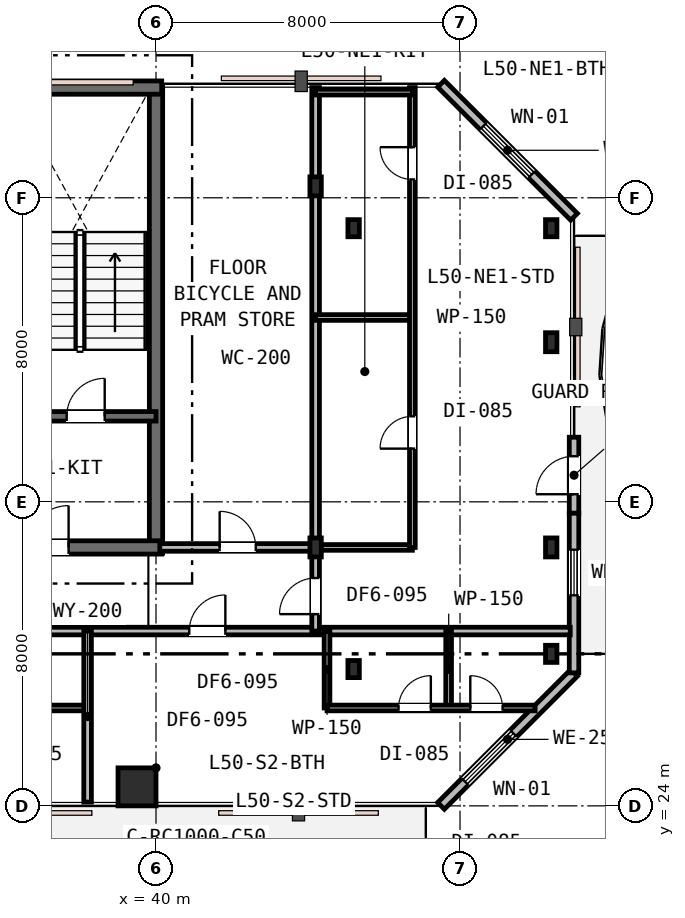
"""IFC4 building model, lengths in metres.
Left out: names, types, materials, properties, quantities, classifications, styles, units other than length and angle.
Written with IfcOpenShell. Run it as: python <this file> out.ifc"""

import sys

from ifc_helpers import new_model, si_unit, direction, frame, frame_2d, origin, origin_2d, place, context, subcontext, project, spatial, rectangle, i_section, extrude, element, fill, save


model = new_model("IFC4")
c1 = context("Model", 3, precision=1e-05, world=origin(), true_north=direction((0.0, 1.0)))
c2 = subcontext(c1, "Body", "Model", "MODEL_VIEW")
j1 = project(units=[si_unit("LENGTHUNIT", "METRE"), si_unit("PLANEANGLEUNIT", "RADIAN")], contexts=[c1])
p1 = place(None, origin())
s1 = spatial("IfcSite", under=j1, at=p1, CompositionType="ELEMENT")
p2 = place(p1, origin())
s2 = spatial("IfcBuilding", under=s1, at=p2, CompositionType="ELEMENT")
p3 = place(p2, frame((0.0, 0.0, 193.8)))
s3 = spatial("IfcBuildingStorey", under=s2, at=p3, CompositionType="ELEMENT", Elevation=193.8)
p4 = place(p3, frame((40.0, 30.65, 0.0), z_axis=(0.0, 0.0, 1.0), x_axis=(0.0, 1.0, 0.0)))
e1 = element("IfcWall", 1, at=p4, inside=s3, PredefinedType="SHEAR", context=c2, shape_type="SweptSolid", body=[
    extrude(rectangle(XDim=12.3, YDim=0.35, at=frame_2d((6.15, 0.0))), origin(), (0.0, 0.0, 1.0), 3.6),
])
p5 = place(p3, frame((15.85, 42.9, 0.0), z_axis=(0.0, 0.0, 1.0), x_axis=(1.0, 0.0, 0.0)))
e2 = element("IfcWall", 2, at=p5, inside=s3, PredefinedType="SHEAR", context=c2, shape_type="SweptSolid", body=[
    extrude(rectangle(XDim=24.3, YDim=0.35, at=frame_2d((12.15, 0.0))), origin(), (0.0, 0.0, 1.0), 3.6),
])
p6 = place(p3, frame((28.95, 30.8, 0.0), z_axis=(0.0, 0.0, 1.0), x_axis=(1.0, 0.0, 0.0)))
e3 = element("IfcWall", 3, at=p6, inside=s3, PredefinedType="SHEAR", context=c2, shape_type="SweptSolid", body=[
    extrude(rectangle(XDim=11.2, YDim=0.35, at=frame_2d((5.6, 0.0))), origin(), (0.0, 0.0, 1.0), 3.6),
])
p7 = place(p6, frame((7.65, 0.0, 0.0)))
e4 = element("IfcOpeningElement", 4, at=p7, cuts=e3, PredefinedType="OPENING", context=c2, shape_type="SweptSolid", body=[
    extrude(rectangle(XDim=1.1, YDim=2.15, at=frame_2d((0.55, 1.075))), frame((0.0, 0.185, 0.0), z_axis=(0.0, -1.0, 0.0), x_axis=(1.0, 0.0, 0.0)), (0.0, 0.0, 1.0), 0.37),
])
p8 = place(p3, frame((33.95, 34.25, 0.0), z_axis=(0.0, 0.0, 1.0), x_axis=(1.0, 0.0, 0.0)))
e5 = element("IfcWall", 5, at=p8, inside=s3, PredefinedType="SHEAR", context=c2, shape_type="SweptSolid", body=[
    extrude(rectangle(XDim=6.05, YDim=0.25, at=frame_2d((3.025, 0.0))), origin(), (0.0, 0.0, 1.0), 3.6),
])
p9 = place(p8, frame((3.7, 0.0, 0.0)))
e6 = element("IfcOpeningElement", 6, at=p9, cuts=e5, PredefinedType="OPENING", context=c2, shape_type="SweptSolid", body=[
    extrude(rectangle(XDim=1.0, YDim=2.15, at=frame_2d((0.5, 1.075))), frame((0.0, 0.135, 0.0), z_axis=(0.0, -1.0, 0.0), x_axis=(1.0, 0.0, 0.0)), (0.0, 0.0, 1.0), 0.27),
])
p10 = place(p8, frame((0.55, 0.0, 0.0)))
e7 = element("IfcOpeningElement", 7, at=p10, cuts=e5, PredefinedType="OPENING", context=c2, shape_type="SweptSolid", body=[
    extrude(rectangle(XDim=1.1, YDim=2.15, at=frame_2d((0.55, 1.075))), frame((0.0, 0.135, 0.0), z_axis=(0.0, -1.0, 0.0), x_axis=(1.0, 0.0, 0.0)), (0.0, 0.0, 1.0), 0.27),
])
p11 = place(p3, frame((39.5, 24.5, 0.0), z_axis=(0.0, 0.0, 1.0), x_axis=(1.0, 0.0, 0.0)))
e8 = element("IfcColumn", 8, at=p11, inside=s3, PredefinedType="COLUMN", context=c2, shape_type="SweptSolid", body=[
    extrude(rectangle(XDim=1.0, YDim=1.0, at=origin_2d()), origin(), (0.0, 0.0, 1.0), 3.6),
])
for number, where, z_axis, x_axis in (
    (9, (45.2, 27.6, 0.0), (0.0, 0.0, 1.0), (1.0, 0.0, 0.0)),
    (10, (45.2, 39.2, 0.0), (0.0, 0.0, 1.0), (1.0, 0.0, 0.0)),
    (11, (50.4, 28.0, 0.0), (0.0, 0.0, 1.0), (1.0, 0.0, 0.0)),
    (12, (50.4, 39.2, 0.0), (0.0, 0.0, 1.0), (1.0, 0.0, 0.0)),
):
    element("IfcColumn", number, at=place(p3, frame(where, z_axis=z_axis, x_axis=x_axis)), inside=s3, PredefinedType="COLUMN", context=c2, shape_type="SweptSolid", body=[
        extrude(i_section(OverallWidth=0.3, OverallDepth=0.45, WebThickness=0.014, FlangeThickness=0.026, FilletRadius=0.027, at=origin_2d()), origin(), (0.0, 0.0, 1.0), 3.6),
    ])
for number, where, z_axis, x_axis in (
    (13, (44.2, 30.8, 0.0), (0.0, 0.0, 1.0), (1.0, 0.0, 0.0)),
    (14, (44.2, 40.3, 0.0), (0.0, 0.0, 1.0), (1.0, 0.0, 0.0)),
    (15, (50.4, 30.8, 0.0), (0.0, 0.0, 1.0), (1.0, 0.0, 0.0)),
    (16, (50.4, 36.2, 0.0), (0.0, 0.0, 1.0), (1.0, 0.0, 0.0)),
):
    element("IfcColumn", number, at=place(p3, frame(where, z_axis=z_axis, x_axis=x_axis)), inside=s3, PredefinedType="COLUMN", context=c2, shape_type="SweptSolid", body=[
        extrude(i_section(OverallWidth=0.3, OverallDepth=0.5, WebThickness=0.015, FlangeThickness=0.028, FilletRadius=0.027, at=origin_2d()), origin(), (0.0, 0.0, 1.0), 3.6),
    ])
p12 = place(p3, frame((47.5, 24.0, 0.0), z_axis=(0.0, 0.0, 1.0), x_axis=(0.707106781187, 0.707106781187, 0.0)))
e17 = element("IfcWall", 17, at=p12, inside=s3, PredefinedType="STANDARD", context=c2, shape_type="SweptSolid", body=[
    extrude(rectangle(XDim=4.95, YDim=0.25, at=frame_2d((2.475, 0.0))), origin(), (0.0, 0.0, 1.0), 3.33),
])
p13 = place(p12, frame((0.896, 0.0, 0.75)))
e18 = element("IfcOpeningElement", 18, at=p13, cuts=e17, PredefinedType="OPENING", context=c2, shape_type="SweptSolid", body=[
    extrude(rectangle(XDim=1.8, YDim=1.85, at=frame_2d((0.9, 0.925))), frame((0.0, 0.135, 0.0), z_axis=(0.0, -1.0, 0.0), x_axis=(1.0, 0.0, 0.0)), (0.0, 0.0, 1.0), 0.27),
])
p14 = place(p3, frame((51.0, 31.7, 0.0), z_axis=(0.0, 0.0, 1.0), x_axis=(0.0, 1.0, 0.0)))
e19 = element("IfcWall", 19, at=p14, inside=s3, PredefinedType="STANDARD", context=c2, shape_type="SweptSolid", body=[
    extrude(rectangle(XDim=2.0, YDim=0.25, at=frame_2d((1.0, 0.0))), origin(), (0.0, 0.0, 1.0), 3.33),
])
p15 = place(p14, frame((0.5, 0.0, 0.0)))
e20 = element("IfcOpeningElement", 20, at=p15, cuts=e19, PredefinedType="OPENING", context=c2, shape_type="SweptSolid", body=[
    extrude(rectangle(XDim=1.0, YDim=2.15, at=frame_2d((0.5, 1.075))), frame((0.0, 0.135, 0.0), z_axis=(0.0, -1.0, 0.0), x_axis=(1.0, 0.0, 0.0)), (0.0, 0.0, 1.0), 0.27),
])
p16 = place(p3, frame((51.0, 27.5, 0.0), z_axis=(0.0, 0.0, 1.0), x_axis=(0.0, 1.0, 0.0)))
e21 = element("IfcWall", 21, at=p16, inside=s3, PredefinedType="STANDARD", context=c2, shape_type="SweptSolid", body=[
    extrude(rectangle(XDim=4.2, YDim=0.25, at=frame_2d((2.1, 0.0))), origin(), (0.0, 0.0, 1.0), 3.33),
])
p17 = place(p16, frame((2.04, 0.0, 0.85)))
e22 = element("IfcOpeningElement", 22, at=p17, cuts=e21, PredefinedType="OPENING", context=c2, shape_type="SweptSolid", body=[
    extrude(rectangle(XDim=1.2, YDim=1.6, at=frame_2d((0.6, 0.8))), frame((0.0, 0.135, 0.0), z_axis=(0.0, -1.0, 0.0), x_axis=(1.0, 0.0, 0.0)), (0.0, 0.0, 1.0), 0.27),
])
p18 = place(p3, frame((51.0, 39.5, 0.0), z_axis=(0.0, 0.0, 1.0), x_axis=(-0.707106781187, 0.707106781187, 0.0)))
e23 = element("IfcWall", 23, at=p18, inside=s3, PredefinedType="STANDARD", context=c2, shape_type="SweptSolid", body=[
    extrude(rectangle(XDim=4.95, YDim=0.25, at=frame_2d((2.475, 0.0))), origin(), (0.0, 0.0, 1.0), 3.33),
])
p19 = place(p18, frame((1.575, 0.0, 0.75)))
e24 = element("IfcOpeningElement", 24, at=p19, cuts=e23, PredefinedType="OPENING", context=c2, shape_type="SweptSolid", body=[
    extrude(rectangle(XDim=1.8, YDim=1.85, at=frame_2d((0.9, 0.925))), frame((0.0, 0.135, 0.0), z_axis=(0.0, -1.0, 0.0), x_axis=(1.0, 0.0, 0.0)), (0.0, 0.0, 1.0), 0.27),
])
p20 = place(p3, frame((11.6, 28.6, 0.0), z_axis=(0.0, 0.0, 1.0), x_axis=(1.0, 0.0, 0.0)))
e25 = element("IfcWall", 25, at=p20, inside=s3, PredefinedType="PARTITIONING", context=c2, shape_type="SweptSolid", body=[
    extrude(rectangle(XDim=39.3, YDim=0.2, at=frame_2d((19.65, 0.0))), origin(), (0.0, 0.0, 1.0), 2.92),
])
p21 = place(p20, frame((15.825, 0.0, 0.0)))
e26 = element("IfcOpeningElement", 26, at=p21, cuts=e25, PredefinedType="OPENING", context=c2, shape_type="SweptSolid", body=[
    extrude(rectangle(XDim=0.95, YDim=2.15, at=frame_2d((0.475, 1.075))), frame((0.0, 0.11, 0.0), z_axis=(0.0, -1.0, 0.0), x_axis=(1.0, 0.0, 0.0)), (0.0, 0.0, 1.0), 0.22),
])
p22 = place(p20, frame((29.275, 0.0, 0.0)))
e27 = element("IfcOpeningElement", 27, at=p22, cuts=e25, PredefinedType="OPENING", context=c2, shape_type="SweptSolid", body=[
    extrude(rectangle(XDim=0.95, YDim=2.15, at=frame_2d((0.475, 1.075))), frame((0.0, 0.11, 0.0), z_axis=(0.0, -1.0, 0.0), x_axis=(1.0, 0.0, 0.0)), (0.0, 0.0, 1.0), 0.22),
])
p23 = place(p3, frame((40.1, 30.8, 0.0), z_axis=(0.0, 0.0, 1.0), x_axis=(1.0, 0.0, 0.0)))
e28 = element("IfcWall", 28, at=p23, inside=s3, PredefinedType="PARTITIONING", context=c2, shape_type="SweptSolid", body=[
    extrude(rectangle(XDim=4.1, YDim=0.2, at=frame_2d((2.05, 0.0))), origin(), (0.0, 0.0, 1.0), 2.92),
])
p24 = place(p23, frame((1.575, 0.0, 0.0)))
e29 = element("IfcOpeningElement", 29, at=p24, cuts=e28, PredefinedType="OPENING", context=c2, shape_type="SweptSolid", body=[
    extrude(rectangle(XDim=0.95, YDim=2.15, at=frame_2d((0.475, 1.075))), frame((0.0, 0.11, 0.0), z_axis=(0.0, -1.0, 0.0), x_axis=(1.0, 0.0, 0.0)), (0.0, 0.0, 1.0), 0.22),
])
p25 = place(p3, frame((44.2, 28.6, 0.0), z_axis=(0.0, 0.0, 1.0), x_axis=(0.0, 1.0, 0.0)))
e30 = element("IfcWall", 30, at=p25, inside=s3, PredefinedType="PARTITIONING", context=c2, shape_type="SweptSolid", body=[
    extrude(rectangle(XDim=14.3, YDim=0.2, at=frame_2d((7.15, 0.0))), origin(), (0.0, 0.0, 1.0), 2.92),
])
p26 = place(p25, frame((0.445, 0.0, 0.0)))
e31 = element("IfcOpeningElement", 31, at=p26, cuts=e30, PredefinedType="OPENING", context=c2, shape_type="SweptSolid", body=[
    extrude(rectangle(XDim=0.95, YDim=2.15, at=frame_2d((0.475, 1.075))), frame((0.0, 0.11, 0.0), z_axis=(0.0, -1.0, 0.0), x_axis=(1.0, 0.0, 0.0)), (0.0, 0.0, 1.0), 0.22),
])
for number, where, z_axis, x_axis in (
    (32, (44.2, 30.8, 0.0), (0.0, 0.0, 1.0), (1.0, 0.0, 0.0)),
    (33, (44.2, 36.85, 0.0), (0.0, 0.0, 1.0), (1.0, 0.0, 0.0)),
):
    element("IfcWall", number, at=place(p3, frame(where, z_axis=z_axis, x_axis=x_axis)), inside=s3, PredefinedType="PARTITIONING", context=c2, shape_type="SweptSolid", body=[
        extrude(rectangle(XDim=2.546, YDim=0.15, at=frame_2d((1.273, 0.0))), origin(), (0.0, 0.0, 1.0), 2.92),
    ])
p27 = place(p3, frame((46.746, 30.8, 0.0), z_axis=(0.0, 0.0, 1.0), x_axis=(0.0, 1.0, 0.0)))
e34 = element("IfcWall", 34, at=p27, inside=s3, PredefinedType="PARTITIONING", context=c2, shape_type="SweptSolid", body=[
    extrude(rectangle(XDim=12.1, YDim=0.15, at=frame_2d((6.05, 0.0))), origin(), (0.0, 0.0, 1.0), 2.92),
])
p28 = place(p27, frame((2.6, 0.0, 0.0)))
e35 = element("IfcOpeningElement", 35, at=p28, cuts=e34, PredefinedType="OPENING", context=c2, shape_type="SweptSolid", body=[
    extrude(rectangle(XDim=0.85, YDim=2.15, at=frame_2d((0.425, 1.075))), frame((0.0, 0.085, 0.0), z_axis=(0.0, -1.0, 0.0), x_axis=(1.0, 0.0, 0.0)), (0.0, 0.0, 1.0), 0.17),
])
p29 = place(p27, frame((9.682, 0.0, 0.0)))
e36 = element("IfcOpeningElement", 36, at=p29, cuts=e34, PredefinedType="OPENING", context=c2, shape_type="SweptSolid", body=[
    extrude(rectangle(XDim=0.85, YDim=2.15, at=frame_2d((0.425, 1.075))), frame((0.0, 0.085, 0.0), z_axis=(0.0, -1.0, 0.0), x_axis=(1.0, 0.0, 0.0)), (0.0, 0.0, 1.0), 0.17),
])
p30 = place(p3, frame((44.2, 42.78, 0.0), z_axis=(0.0, 0.0, 1.0), x_axis=(1.0, 0.0, 0.0)))
e37 = element("IfcWall", 37, at=p30, inside=s3, PredefinedType="PARTITIONING", context=c2, shape_type="SweptSolid", body=[
    extrude(rectangle(XDim=2.546, YDim=0.15, at=frame_2d((1.273, 0.0))), origin(), (0.0, 0.0, 1.0), 3.33),
])
p31 = place(p3, frame((31.8, 26.576, 0.0), z_axis=(0.0, 0.0, 1.0), x_axis=(1.0, 0.0, 0.0)))
e38 = element("IfcWall", 38, at=p31, inside=s3, PredefinedType="PARTITIONING", context=c2, shape_type="SweptSolid", body=[
    extrude(rectangle(XDim=6.4, YDim=0.15, at=frame_2d((3.2, 0.0))), origin(), (0.0, 0.0, 1.0), 2.92),
])
p32 = place(p31, frame((1.472, 0.0, 0.0)))
e39 = element("IfcOpeningElement", 39, at=p32, cuts=e38, PredefinedType="OPENING", context=c2, shape_type="SweptSolid", body=[
    extrude(rectangle(XDim=0.85, YDim=2.15, at=frame_2d((0.425, 1.075))), frame((0.0, 0.085, 0.0), z_axis=(0.0, -1.0, 0.0), x_axis=(1.0, 0.0, 0.0)), (0.0, 0.0, 1.0), 0.17),
])
p33 = place(p31, frame((4.375, 0.0, 0.0)))
e40 = element("IfcOpeningElement", 40, at=p33, cuts=e38, PredefinedType="OPENING", context=c2, shape_type="SweptSolid", body=[
    extrude(rectangle(XDim=0.85, YDim=2.15, at=frame_2d((0.425, 1.075))), frame((0.0, 0.085, 0.0), z_axis=(0.0, -1.0, 0.0), x_axis=(1.0, 0.0, 0.0)), (0.0, 0.0, 1.0), 0.17),
])
p34 = place(p3, frame((38.2, 24.1, 0.0), z_axis=(0.0, 0.0, 1.0), x_axis=(0.0, 1.0, 0.0)))
e41 = element("IfcWall", 41, at=p34, inside=s3, PredefinedType="PARTITIONING", context=c2, shape_type="SweptSolid", body=[
    extrude(rectangle(XDim=4.5, YDim=0.2, at=frame_2d((2.25, 0.0))), origin(), (0.0, 0.0, 1.0), 3.02),
])
for number, where, z_axis, x_axis in (
    (42, (44.5, 26.576, 0.0), (0.0, 0.0, 1.0), (0.0, 1.0, 0.0)),
    (43, (47.7, 26.576, 0.0), (0.0, 0.0, 1.0), (0.0, 1.0, 0.0)),
):
    element("IfcWall", number, at=place(p3, frame(where, z_axis=z_axis, x_axis=x_axis)), inside=s3, PredefinedType="PARTITIONING", context=c2, shape_type="SweptSolid", body=[
        extrude(rectangle(XDim=2.024, YDim=0.15, at=frame_2d((1.012, 0.0))), origin(), (0.0, 0.0, 1.0), 3.33),
    ])
p35 = place(p3, frame((44.5, 26.576, 0.0), z_axis=(0.0, 0.0, 1.0), x_axis=(1.0, 0.0, 0.0)))
e44 = element("IfcWall", 44, at=p35, inside=s3, PredefinedType="PARTITIONING", context=c2, shape_type="SweptSolid", body=[
    extrude(rectangle(XDim=5.476, YDim=0.15, at=frame_2d((2.738, 0.0))), origin(), (0.0, 0.0, 1.0), 3.33),
])
p36 = place(p35, frame((1.882, 0.0, 0.0)))
e45 = element("IfcOpeningElement", 45, at=p36, cuts=e44, PredefinedType="OPENING", context=c2, shape_type="SweptSolid", body=[
    extrude(rectangle(XDim=0.85, YDim=2.15, at=frame_2d((0.425, 1.075))), frame((0.0, 0.085, 0.0), z_axis=(0.0, -1.0, 0.0), x_axis=(1.0, 0.0, 0.0)), (0.0, 0.0, 1.0), 0.17),
])
p37 = place(p35, frame((3.77, 0.0, 0.0)))
e46 = element("IfcOpeningElement", 46, at=p37, cuts=e44, PredefinedType="OPENING", context=c2, shape_type="SweptSolid", body=[
    extrude(rectangle(XDim=0.85, YDim=2.15, at=frame_2d((0.425, 1.075))), frame((0.0, 0.085, 0.0), z_axis=(0.0, -1.0, 0.0), x_axis=(1.0, 0.0, 0.0)), (0.0, 0.0, 1.0), 0.17),
])
p38 = place(p13, origin())
e47 = element("IfcWindow", 47, at=p38, inside=s3, PartitioningType="SINGLE_PANEL", PredefinedType="WINDOW", context=c2, shape_type="SweptSolid", body=[
    extrude(rectangle(XDim=1.8, YDim=1.85, at=frame_2d((0.9, 0.925))), frame((0.0, 0.03, 0.0), z_axis=(0.0, -1.0, 0.0), x_axis=(1.0, 0.0, 0.0)), (0.0, 0.0, 1.0), 0.06),
])
fill(e18, e47)
p39 = place(p15, origin())
e48 = element("IfcDoor", 48, at=p39, inside=s3, OperationType="SINGLE_SWING_LEFT", PredefinedType="DOOR", context=c2, shape_type="SweptSolid", body=[
    extrude(rectangle(XDim=1.0, YDim=2.15, at=frame_2d((0.5, 1.075))), frame((0.0, 0.025, 0.0), z_axis=(0.0, -1.0, 0.0), x_axis=(1.0, 0.0, 0.0)), (0.0, 0.0, 1.0), 0.05),
])
fill(e20, e48)
p40 = place(p17, origin())
e49 = element("IfcWindow", 49, at=p40, inside=s3, PartitioningType="SINGLE_PANEL", PredefinedType="WINDOW", context=c2, shape_type="SweptSolid", body=[
    extrude(rectangle(XDim=1.2, YDim=1.6, at=frame_2d((0.6, 0.8))), frame((0.0, 0.03, 0.0), z_axis=(0.0, -1.0, 0.0), x_axis=(1.0, 0.0, 0.0)), (0.0, 0.0, 1.0), 0.06),
])
fill(e22, e49)
p41 = place(p19, origin())
e50 = element("IfcWindow", 50, at=p41, inside=s3, PartitioningType="SINGLE_PANEL", PredefinedType="WINDOW", context=c2, shape_type="SweptSolid", body=[
    extrude(rectangle(XDim=1.8, YDim=1.85, at=frame_2d((0.9, 0.925))), frame((0.0, 0.03, 0.0), z_axis=(0.0, -1.0, 0.0), x_axis=(1.0, 0.0, 0.0)), (0.0, 0.0, 1.0), 0.06),
])
fill(e24, e50)
p42 = place(p9, origin())
e51 = element("IfcDoor", 51, at=p42, inside=s3, OperationType="SINGLE_SWING_RIGHT", PredefinedType="DOOR", context=c2, shape_type="SweptSolid", body=[
    extrude(rectangle(XDim=1.0, YDim=2.15, at=frame_2d((0.5, 1.075))), frame((0.0, 0.025, 0.0), z_axis=(0.0, -1.0, 0.0), x_axis=(1.0, 0.0, 0.0)), (0.0, 0.0, 1.0), 0.05),
])
fill(e6, e51)
p43 = place(p7, origin())
e52 = element("IfcDoor", 52, at=p43, inside=s3, OperationType="SINGLE_SWING_RIGHT", PredefinedType="DOOR", context=c2, shape_type="SweptSolid", body=[
    extrude(rectangle(XDim=1.1, YDim=2.15, at=frame_2d((0.55, 1.075))), frame((0.0, 0.025, 0.0), z_axis=(0.0, -1.0, 0.0), x_axis=(1.0, 0.0, 0.0)), (0.0, 0.0, 1.0), 0.05),
])
fill(e4, e52)
p44 = place(p24, origin())
e53 = element("IfcDoor", 53, at=p44, inside=s3, OperationType="SINGLE_SWING_LEFT", PredefinedType="DOOR", context=c2, shape_type="SweptSolid", body=[
    extrude(rectangle(XDim=0.95, YDim=2.15, at=frame_2d((0.475, 1.075))), frame((0.0, 0.025, 0.0), z_axis=(0.0, -1.0, 0.0), x_axis=(1.0, 0.0, 0.0)), (0.0, 0.0, 1.0), 0.05),
])
fill(e29, e53)
p45 = place(p26, origin())
e54 = element("IfcDoor", 54, at=p45, inside=s3, OperationType="SINGLE_SWING_LEFT", PredefinedType="DOOR", context=c2, shape_type="SweptSolid", body=[
    extrude(rectangle(XDim=0.95, YDim=2.15, at=frame_2d((0.475, 1.075))), frame((0.0, 0.025, 0.0), z_axis=(0.0, -1.0, 0.0), x_axis=(1.0, 0.0, 0.0)), (0.0, 0.0, 1.0), 0.05),
])
fill(e31, e54)
p46 = place(p28, origin())
e55 = element("IfcDoor", 55, at=p46, inside=s3, OperationType="SINGLE_SWING_LEFT", PredefinedType="DOOR", context=c2, shape_type="SweptSolid", body=[
    extrude(rectangle(XDim=0.85, YDim=2.15, at=frame_2d((0.425, 1.075))), frame((0.0, 0.025, 0.0), z_axis=(0.0, -1.0, 0.0), x_axis=(1.0, 0.0, 0.0)), (0.0, 0.0, 1.0), 0.05),
])
fill(e35, e55)
p47 = place(p29, origin())
e56 = element("IfcDoor", 56, at=p47, inside=s3, OperationType="SINGLE_SWING_RIGHT", PredefinedType="DOOR", context=c2, shape_type="SweptSolid", body=[
    extrude(rectangle(XDim=0.85, YDim=2.15, at=frame_2d((0.425, 1.075))), frame((0.0, 0.025, 0.0), z_axis=(0.0, -1.0, 0.0), x_axis=(1.0, 0.0, 0.0)), (0.0, 0.0, 1.0), 0.05),
])
fill(e36, e56)
p48 = place(p22, origin())
e57 = element("IfcDoor", 57, at=p48, inside=s3, OperationType="SINGLE_SWING_RIGHT", PredefinedType="DOOR", context=c2, shape_type="SweptSolid", body=[
    extrude(rectangle(XDim=0.95, YDim=2.15, at=frame_2d((0.475, 1.075))), frame((0.0, 0.025, 0.0), z_axis=(0.0, -1.0, 0.0), x_axis=(1.0, 0.0, 0.0)), (0.0, 0.0, 1.0), 0.05),
])
fill(e27, e57)
p49 = place(p36, origin())
e58 = element("IfcDoor", 58, at=p49, inside=s3, OperationType="SINGLE_SWING_RIGHT", PredefinedType="DOOR", context=c2, shape_type="SweptSolid", body=[
    extrude(rectangle(XDim=0.85, YDim=2.15, at=frame_2d((0.425, 1.075))), frame((0.0, 0.025, 0.0), z_axis=(0.0, -1.0, 0.0), x_axis=(1.0, 0.0, 0.0)), (0.0, 0.0, 1.0), 0.05),
])
fill(e45, e58)
p50 = place(p37, origin())
e59 = element("IfcDoor", 59, at=p50, inside=s3, OperationType="SINGLE_SWING_LEFT", PredefinedType="DOOR", context=c2, shape_type="SweptSolid", body=[
    extrude(rectangle(XDim=0.85, YDim=2.15, at=frame_2d((0.425, 1.075))), frame((0.0, 0.025, 0.0), z_axis=(0.0, -1.0, 0.0), x_axis=(1.0, 0.0, 0.0)), (0.0, 0.0, 1.0), 0.05),
])
fill(e46, e59)
save(model, sys.argv[1])
